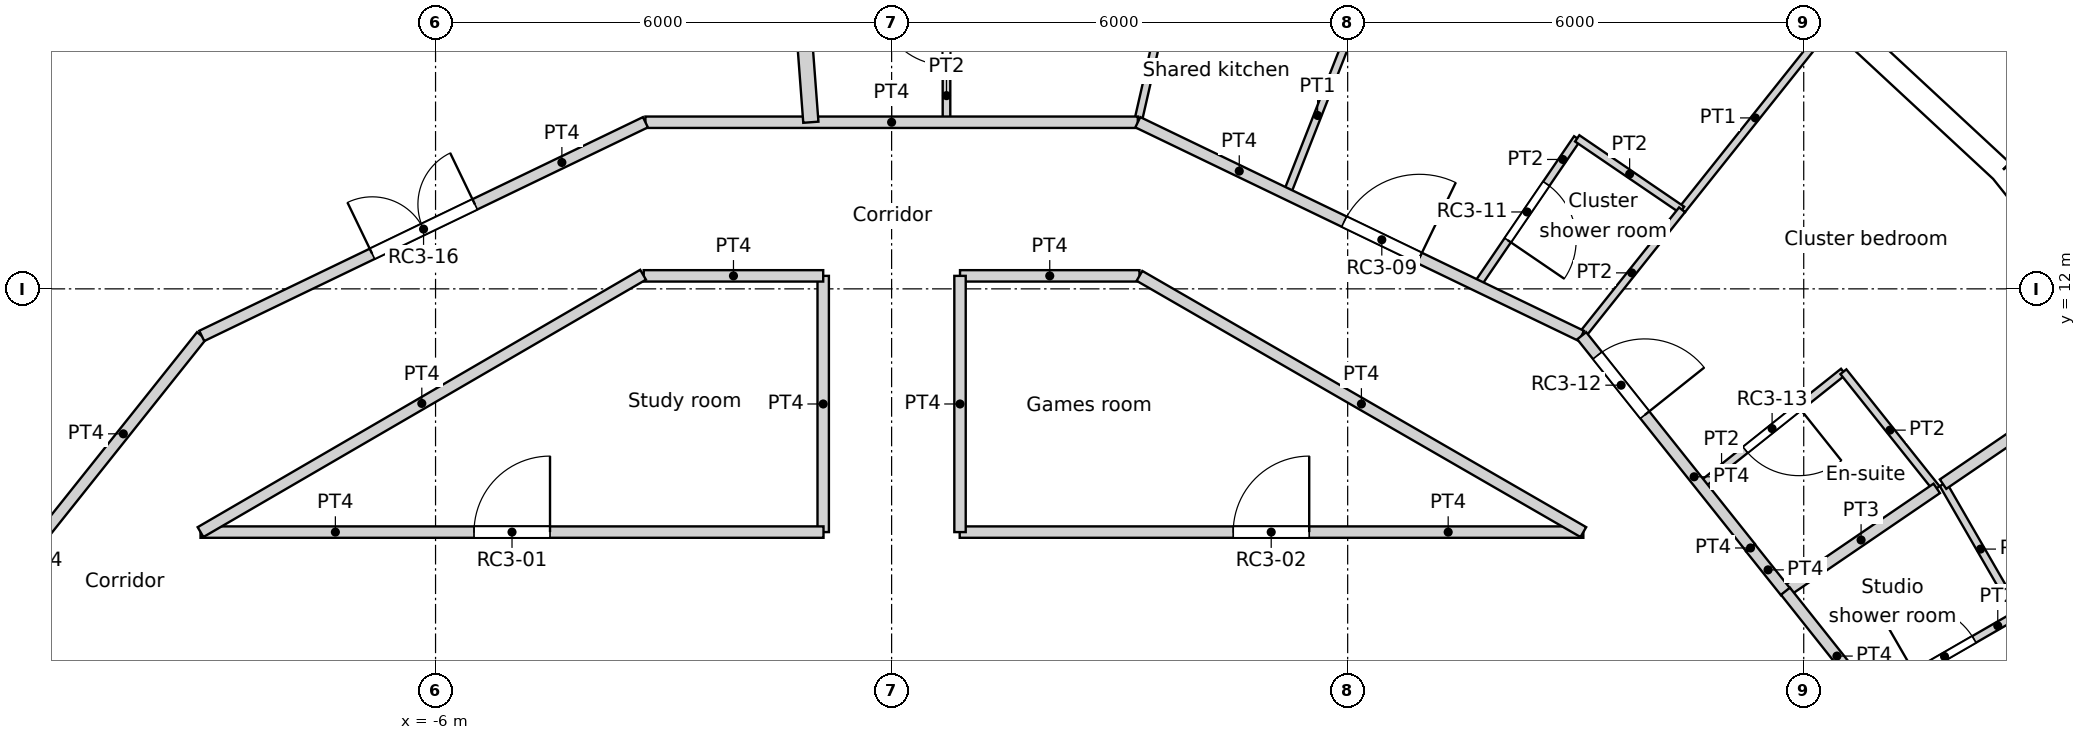
"""IFC4 building model, lengths in metres.
Left out: names, types, materials, properties, quantities, classifications, styles, units other than length and angle.
Written with IfcOpenShell. Run it as: python <this file> out.ifc"""

import sys

from ifc_helpers import new_model, si_unit, direction, frame, frame_2d, origin, origin_2d, place, context, subcontext, project, spatial, rectangle, circle, extrude, element, fill, save


model = new_model("IFC4")
c1 = context("Model", 3, precision=1e-05, world=origin(), true_north=direction((0.0, 1.0)))
c2 = subcontext(c1, "Body", "Model", "MODEL_VIEW")
j1 = project(units=[si_unit("LENGTHUNIT", "METRE"), si_unit("PLANEANGLEUNIT", "RADIAN")], contexts=[c1])
p1 = place(None, origin())
s1 = spatial("IfcSite", under=j1, at=p1, CompositionType="ELEMENT")
p2 = place(p1, origin())
s2 = spatial("IfcBuilding", under=s1, at=p2, CompositionType="ELEMENT")
p3 = place(p2, frame((0.0, 0.0, 252.6)))
s3 = spatial("IfcBuildingStorey", under=s2, at=p3, CompositionType="ELEMENT", Elevation=252.6)
p4 = place(p3, frame((11.735, 14.716, 0.0), z_axis=(0.0, 0.0, 1.0), x_axis=(1.0, 0.0, 0.0)))
e1 = element("IfcColumn", 1, at=p4, inside=s3, PredefinedType="COLUMN", context=c2, shape_type="SweptSolid", body=[
    extrude(circle(Radius=0.55, at=origin_2d()), origin(), (0.0, 0.0, 1.0), 3.6),
])
p5 = place(p3, frame((16.451, 11.234, 0.0), z_axis=(0.0, 0.0, 1.0), x_axis=(-0.623498236992, 0.781824755599, 0.0)))
e2 = element("IfcWall", 2, at=p5, inside=s3, PredefinedType="SOLIDWALL", context=c2, shape_type="SweptSolid", body=[
    extrude(rectangle(XDim=2.962, YDim=0.3, at=frame_2d((1.481, 0.0))), origin(), (0.0, 0.0, 1.0), 3.25),
])
p6 = place(p5, frame((1.481, 0.0, 1.55)))
e3 = element("IfcOpeningElement", 3, at=p6, cuts=e2, PredefinedType="OPENING", context=c2, shape_type="SweptSolid", body=[
    extrude(circle(Radius=0.9, at=origin_2d()), frame((0.0, 0.16, 0.0), z_axis=(0.0, -1.0, 0.0), x_axis=(1.0, 0.0, 0.0)), (0.0, 0.0, 1.0), 0.32),
])
p7 = place(p3, frame((14.604, 13.55, 0.0), z_axis=(0.0, 0.0, 1.0), x_axis=(-0.733066412643, 0.680157066165, 0.0)))
e4 = element("IfcWall", 4, at=p7, inside=s3, PredefinedType="SOLIDWALL", context=c2, shape_type="SweptSolid", body=[
    extrude(rectangle(XDim=2.962, YDim=0.3, at=frame_2d((1.481, 0.0))), origin(), (0.0, 0.0, 1.0), 3.25),
])
p8 = place(p7, frame((1.481, 0.0, 1.55)))
e5 = element("IfcOpeningElement", 5, at=p8, cuts=e4, PredefinedType="OPENING", context=c2, shape_type="SweptSolid", body=[
    extrude(circle(Radius=0.9, at=origin_2d()), frame((0.0, 0.16, 0.0), z_axis=(0.0, -1.0, 0.0), x_axis=(1.0, 0.0, 0.0)), (0.0, 0.0, 1.0), 0.32),
])
p9 = place(p3, frame((-9.092, 8.8, 0.0), z_axis=(0.0, 0.0, 1.0), x_axis=(0.864470922103, 0.502682827277, 0.0)))
e6 = element("IfcWall", 6, at=p9, inside=s3, PredefinedType="PARTITIONING", context=c2, shape_type="SweptSolid", body=[
    extrude(rectangle(XDim=6.735, YDim=0.15, at=frame_2d((3.368, 0.0))), origin(), (0.0, 0.0, 1.0), 3.25),
])
p10 = place(p3, frame((-9.092, 8.8, 0.0), z_axis=(0.0, 0.0, 1.0), x_axis=(1.0, 0.0, 0.0)))
e7 = element("IfcWall", 7, at=p10, inside=s3, PredefinedType="PARTITIONING", context=c2, shape_type="SweptSolid", body=[
    extrude(rectangle(XDim=8.196, YDim=0.15, at=frame_2d((4.098, 0.0))), origin(), (0.0, 0.0, 1.0), 3.25),
])
p11 = place(p10, frame((3.598, 0.0, 0.0)))
e8 = element("IfcOpeningElement", 8, at=p11, cuts=e7, PredefinedType="OPENING", context=c2, shape_type="SweptSolid", body=[
    extrude(rectangle(XDim=1.0, YDim=2.04, at=frame_2d((0.5, 1.02))), frame((0.0, 0.075, 0.0), z_axis=(0.0, -1.0, 0.0), x_axis=(1.0, 0.0, 0.0)), (0.0, 0.0, 1.0), 0.15),
])
p12 = place(p3, frame((0.896, 8.8, 0.0), z_axis=(0.0, 0.0, 1.0), x_axis=(1.0, 0.0, 0.0)))
e9 = element("IfcWall", 9, at=p12, inside=s3, PredefinedType="PARTITIONING", context=c2, shape_type="SweptSolid", body=[
    extrude(rectangle(XDim=8.205, YDim=0.15, at=frame_2d((4.102, 0.0))), origin(), (0.0, 0.0, 1.0), 3.25),
])
p13 = place(p12, frame((3.598, 0.0, 0.0)))
e10 = element("IfcOpeningElement", 10, at=p13, cuts=e9, PredefinedType="OPENING", context=c2, shape_type="SweptSolid", body=[
    extrude(rectangle(XDim=1.0, YDim=2.04, at=frame_2d((0.5, 1.02))), frame((0.0, 0.075, 0.0), z_axis=(0.0, -1.0, 0.0), x_axis=(1.0, 0.0, 0.0)), (0.0, 0.0, 1.0), 0.15),
])
p14 = place(p3, frame((9.079, 11.384, 0.0), z_axis=(0.0, 0.0, 1.0), x_axis=(0.623165080354, -0.782090328944, 0.0)))
e11 = element("IfcWall", 11, at=p14, inside=s3, PredefinedType="PARTITIONING", context=c2, shape_type="SweptSolid", body=[
    extrude(rectangle(XDim=3.564, YDim=0.15, at=frame_2d((1.782, 0.0))), origin(), (0.0, 0.0, 1.0), 3.25),
])
p15 = place(p14, frame((0.332, 0.0, 0.0)))
e12 = element("IfcOpeningElement", 12, at=p15, cuts=e11, PredefinedType="OPENING", context=c2, shape_type="SweptSolid", body=[
    extrude(rectangle(XDim=1.0, YDim=2.1, at=frame_2d((0.5, 1.05))), frame((0.0, 0.075, 0.0), z_axis=(0.0, -1.0, 0.0), x_axis=(1.0, 0.0, 0.0)), (0.0, 0.0, 1.0), 0.15),
])
p16 = place(p3, frame((11.3, 8.586, 0.0), z_axis=(0.0, 0.0, 1.0), x_axis=(0.0, 1.0, 0.0)))
e13 = element("IfcWall", 13, at=p16, inside=s3, PredefinedType="PARTITIONING", context=c2, shape_type="SweptSolid", body=[
    extrude(rectangle(XDim=0.01, YDim=0.15, at=frame_2d((0.005, 0.0))), origin(), (0.0, 0.0, 1.0), 3.25),
])
p17 = place(p3, frame((-11.136, 8.802, 0.0), z_axis=(0.0, 0.0, 1.0), x_axis=(0.623151397235, 0.782101231379, 0.0)))
e14 = element("IfcWall", 14, at=p17, inside=s3, PredefinedType="PARTITIONING", context=c2, shape_type="SweptSolid", body=[
    extrude(rectangle(XDim=3.301, YDim=0.15, at=frame_2d((1.65, 0.0))), origin(), (0.0, 0.0, 1.0), 3.25),
])
p18 = place(p3, frame((11.76, 8.022, 0.0), z_axis=(0.0, 0.0, 1.0), x_axis=(0.62206805366, -0.782963177049, 0.0)))
e15 = element("IfcWall", 15, at=p18, inside=s3, PredefinedType="PARTITIONING", context=c2, shape_type="SweptSolid", body=[
    extrude(rectangle(XDim=2.179, YDim=0.15, at=frame_2d((1.089, 0.0))), origin(), (0.0, 0.0, 1.0), 3.25),
])
p19 = place(p3, frame((11.3, 8.592, 0.0), z_axis=(0.0, 0.0, 1.0), x_axis=(0.623405636383, -0.781898594785, 0.0)))
e16 = element("IfcWall", 16, at=p19, inside=s3, PredefinedType="PARTITIONING", context=c2, shape_type="SweptSolid", body=[
    extrude(rectangle(XDim=0.74, YDim=0.15, at=frame_2d((0.37, 0.0))), origin(), (0.0, 0.0, 1.0), 3.25),
])
p20 = place(p3, frame((-0.9, 8.8, 0.0), z_axis=(0.0, 0.0, 1.0), x_axis=(0.0, 1.0, 0.0)))
e17 = element("IfcWall", 17, at=p20, inside=s3, PredefinedType="PARTITIONING", context=c2, shape_type="SweptSolid", body=[
    extrude(rectangle(XDim=3.371, YDim=0.15, at=frame_2d((1.686, 0.0))), origin(), (0.0, 0.0, 1.0), 3.25),
])
p21 = place(p3, frame((-3.261, 12.171, 0.0), z_axis=(0.0, 0.0, 1.0), x_axis=(1.0, 0.0, 0.0)))
e18 = element("IfcWall", 18, at=p21, inside=s3, PredefinedType="PARTITIONING", context=c2, shape_type="SweptSolid", body=[
    extrude(rectangle(XDim=2.361, YDim=0.15, at=frame_2d((1.181, 0.0))), origin(), (0.0, 0.0, 1.0), 3.25),
])
p22 = place(p3, frame((3.261, 12.171, 0.0), z_axis=(0.0, 0.0, 1.0), x_axis=(0.866066809554, -0.499928276245, 0.0)))
e19 = element("IfcWall", 19, at=p22, inside=s3, PredefinedType="PARTITIONING", context=c2, shape_type="SweptSolid", body=[
    extrude(rectangle(XDim=6.743, YDim=0.15, at=frame_2d((3.371, 0.0))), origin(), (0.0, 0.0, 1.0), 3.25),
])
p23 = place(p3, frame((0.9, 12.171, 0.0), z_axis=(0.0, 0.0, 1.0), x_axis=(1.0, 0.0, 0.0)))
e20 = element("IfcWall", 20, at=p23, inside=s3, PredefinedType="PARTITIONING", context=c2, shape_type="SweptSolid", body=[
    extrude(rectangle(XDim=2.361, YDim=0.15, at=frame_2d((1.181, 0.0))), origin(), (0.0, 0.0, 1.0), 3.25),
])
p24 = place(p3, frame((0.9, 8.8, 0.0), z_axis=(0.0, 0.0, 1.0), x_axis=(0.0, 1.0, 0.0)))
e21 = element("IfcWall", 21, at=p24, inside=s3, PredefinedType="PARTITIONING", context=c2, shape_type="SweptSolid", body=[
    extrude(rectangle(XDim=3.371, YDim=0.15, at=frame_2d((1.686, 0.0))), origin(), (0.0, 0.0, 1.0), 3.25),
])
p25 = place(p3, frame((3.239, 14.192, 0.0), z_axis=(0.0, 0.0, 1.0), x_axis=(0.90093183072, -0.433960639224, 0.0)))
e22 = element("IfcWall", 22, at=p25, inside=s3, PredefinedType="PARTITIONING", context=c2, shape_type="SweptSolid", body=[
    extrude(rectangle(XDim=6.479, YDim=0.15, at=frame_2d((3.239, 0.0))), origin(), (0.0, 0.0, 1.0), 3.25),
])
p26 = place(p25, frame((3.013, 0.0, 0.0)))
e23 = element("IfcOpeningElement", 23, at=p26, cuts=e22, PredefinedType="OPENING", context=c2, shape_type="SweptSolid", body=[
    extrude(rectangle(XDim=1.1, YDim=2.1, at=frame_2d((0.55, 1.05))), frame((0.0, 0.075, 0.0), z_axis=(0.0, -1.0, 0.0), x_axis=(1.0, 0.0, 0.0)), (0.0, 0.0, 1.0), 0.15),
])
p27 = place(p3, frame((-3.239, 14.192, 0.0), z_axis=(0.0, 0.0, 1.0), x_axis=(1.0, 0.0, 0.0)))
e24 = element("IfcWall", 24, at=p27, inside=s3, PredefinedType="PARTITIONING", context=c2, shape_type="SweptSolid", body=[
    extrude(rectangle(XDim=6.478, YDim=0.15, at=frame_2d((3.239, 0.0))), origin(), (0.0, 0.0, 1.0), 3.25),
])
p28 = place(p3, frame((-9.076, 11.381, 0.0), z_axis=(0.0, 0.0, 1.0), x_axis=(0.900976027191, 0.433868872388, 0.0)))
e25 = element("IfcWall", 25, at=p28, inside=s3, PredefinedType="PARTITIONING", context=c2, shape_type="SweptSolid", body=[
    extrude(rectangle(XDim=6.479, YDim=0.15, at=frame_2d((3.239, 0.0))), origin(), (0.0, 0.0, 1.0), 3.25),
])
p29 = place(p28, frame((2.489, 0.0, 0.0)))
e26 = element("IfcOpeningElement", 26, at=p29, cuts=e25, PredefinedType="OPENING", context=c2, shape_type="SweptSolid", body=[
    extrude(rectangle(XDim=1.5, YDim=2.1, at=frame_2d((0.75, 1.05))), frame((0.0, 0.075, 0.0), z_axis=(0.0, -1.0, 0.0), x_axis=(1.0, 0.0, 0.0)), (0.0, 0.0, 1.0), 0.15),
])
p30 = place(p3, frame((12.885, 6.605, 0.0), z_axis=(0.0, 0.0, 1.0), x_axis=(0.866076416361, 0.499911633214, 0.0)))
e27 = element("IfcWall", 27, at=p30, inside=s3, PredefinedType="PARTITIONING", context=c2, shape_type="SweptSolid", body=[
    extrude(rectangle(XDim=2.234, YDim=0.1, at=frame_2d((1.117, 0.0))), origin(), (0.0, 0.0, 1.0), 3.25),
])
p31 = place(p30, frame((0.667, 0.0, 0.0)))
e28 = element("IfcOpeningElement", 28, at=p31, cuts=e27, PredefinedType="OPENING", context=c2, shape_type="SweptSolid", body=[
    extrude(rectangle(XDim=0.9, YDim=2.04, at=frame_2d((0.45, 1.02))), frame((0.0, 0.05, 0.0), z_axis=(0.0, -1.0, 0.0), x_axis=(1.0, 0.0, 0.0)), (0.0, 0.0, 1.0), 0.1),
])
p32 = place(p3, frame((13.833, 9.431, 0.0), z_axis=(0.0, 0.0, 1.0), x_axis=(0.500143626598, -0.865942465048, 0.0)))
e29 = element("IfcWall", 29, at=p32, inside=s3, PredefinedType="PARTITIONING", context=c2, shape_type="SweptSolid", body=[
    extrude(rectangle(XDim=1.974, YDim=0.1, at=frame_2d((0.987, 0.0))), origin(), (0.0, 0.0, 1.0), 3.25),
])
p33 = place(p3, frame((13.833, 9.431, 0.0), z_axis=(0.0, 0.0, 1.0), x_axis=(0.826152320289, 0.56344684193, 0.0)))
e30 = element("IfcWall", 30, at=p33, inside=s3, PredefinedType="PARTITIONING", context=c2, shape_type="SweptSolid", body=[
    extrude(rectangle(XDim=3.03, YDim=0.15, at=frame_2d((1.515, 0.0))), origin(), (0.0, 0.0, 1.0), 3.25),
])
p34 = place(p3, frame((11.759, 8.017, 0.0), z_axis=(0.0, 0.0, 1.0), x_axis=(0.826143746222, 0.563459413426, 0.0)))
e31 = element("IfcWall", 31, at=p34, inside=s3, PredefinedType="PARTITIONING", context=c2, shape_type="SweptSolid", body=[
    extrude(rectangle(XDim=2.41, YDim=0.15, at=frame_2d((1.205, 0.0))), origin(), (0.0, 0.0, 1.0), 3.25),
])
p35 = place(p3, frame((5.199, 13.248, 0.0), z_axis=(0.0, 0.0, 1.0), x_axis=(0.365334662456, 0.930876245485, 0.0)))
e32 = element("IfcWall", 32, at=p35, inside=s3, PredefinedType="PARTITIONING", context=c2, shape_type="SweptSolid", body=[
    extrude(rectangle(XDim=5.54, YDim=0.1, at=frame_2d((2.77, 0.0))), origin(), (0.0, 0.0, 1.0), 3.25),
])
p36 = place(p35, frame((2.27, 0.0, 0.0)))
e33 = element("IfcOpeningElement", 33, at=p36, cuts=e32, PredefinedType="OPENING", context=c2, shape_type="SweptSolid", body=[
    extrude(rectangle(XDim=1.0, YDim=2.04, at=frame_2d((0.5, 1.02))), frame((0.0, 0.05, 0.0), z_axis=(0.0, -1.0, 0.0), x_axis=(1.0, 0.0, 0.0)), (0.0, 0.0, 1.0), 0.1),
])
p37 = place(p3, frame((9.02, 13.98, 0.0), z_axis=(0.0, 0.0, 1.0), x_axis=(0.826289240924, -0.563246030021, 0.0)))
e34 = element("IfcWall", 34, at=p37, inside=s3, PredefinedType="PARTITIONING", context=c2, shape_type="SweptSolid", body=[
    extrude(rectangle(XDim=1.669, YDim=0.1, at=frame_2d((0.834, 0.0))), origin(), (0.0, 0.0, 1.0), 3.25),
])
p38 = place(p3, frame((7.7, 12.044, 0.0), z_axis=(0.0, 0.0, 1.0), x_axis=(0.563349756349, 0.826218525586, 0.0)))
e35 = element("IfcWall", 35, at=p38, inside=s3, PredefinedType="PARTITIONING", context=c2, shape_type="SweptSolid", body=[
    extrude(rectangle(XDim=2.343, YDim=0.1, at=frame_2d((1.172, 0.0))), origin(), (0.0, 0.0, 1.0), 3.25),
])
p39 = place(p38, frame((0.721, 0.0, 0.0)))
e36 = element("IfcOpeningElement", 36, at=p39, cuts=e35, PredefinedType="OPENING", context=c2, shape_type="SweptSolid", body=[
    extrude(rectangle(XDim=0.9, YDim=2.0, at=frame_2d((0.45, 1.0))), frame((0.0, 0.05, 0.0), z_axis=(0.0, -1.0, 0.0), x_axis=(1.0, 0.0, 0.0)), (0.0, 0.0, 1.0), 0.1),
])
p40 = place(p3, frame((10.399, 13.04, 0.0), z_axis=(0.0, 0.0, 1.0), x_axis=(0.62343302941, 0.781876753613, 0.0)))
e37 = element("IfcWall", 37, at=p40, inside=s3, PredefinedType="PARTITIONING", context=c2, shape_type="SweptSolid", body=[
    extrude(rectangle(XDim=3.093, YDim=0.1, at=frame_2d((1.546, 0.0))), origin(), (0.0, 0.0, 1.0), 3.25),
])
p41 = place(p3, frame((3.239, 14.192, 0.0), z_axis=(0.0, 0.0, 1.0), x_axis=(0.222612505682, 0.974907007008, 0.0)))
e38 = element("IfcWall", 38, at=p41, inside=s3, PredefinedType="PARTITIONING", context=c2, shape_type="SweptSolid", body=[
    extrude(rectangle(XDim=5.215, YDim=0.1, at=frame_2d((2.607, 0.0))), origin(), (0.0, 0.0, 1.0), 3.25),
])
p42 = place(p41, frame((2.353, 0.0, 0.0)))
e39 = element("IfcOpeningElement", 39, at=p42, cuts=e38, PredefinedType="OPENING", context=c2, shape_type="SweptSolid", body=[
    extrude(rectangle(XDim=0.9, YDim=2.1, at=frame_2d((0.45, 1.05))), frame((0.0, 0.05, 0.0), z_axis=(0.0, -1.0, 0.0), x_axis=(1.0, 0.0, 0.0)), (0.0, 0.0, 1.0), 0.1),
])
p43 = place(p3, frame((9.076, 11.381, 0.0), z_axis=(0.0, 0.0, 1.0), x_axis=(0.623501640025, 0.781822041699, 0.0)))
e40 = element("IfcWall", 40, at=p43, inside=s3, PredefinedType="PARTITIONING", context=c2, shape_type="SweptSolid", body=[
    extrude(rectangle(XDim=2.122, YDim=0.1, at=frame_2d((1.061, 0.0))), origin(), (0.0, 0.0, 1.0), 3.25),
])
p44 = place(p3, frame((12.522, 10.91, 0.0), z_axis=(0.0, 0.0, 1.0), x_axis=(0.623330716607, -0.781958322249, 0.0)))
e41 = element("IfcWall", 41, at=p44, inside=s3, PredefinedType="PARTITIONING", context=c2, shape_type="SweptSolid", body=[
    extrude(rectangle(XDim=1.965, YDim=0.1, at=frame_2d((0.983, 0.0))), origin(), (0.0, 0.0, 1.0), 3.25),
])
p45 = place(p3, frame((10.645, 9.413, 0.0), z_axis=(0.0, 0.0, 1.0), x_axis=(0.781830263661, 0.623491330191, 0.0)))
e42 = element("IfcWall", 42, at=p45, inside=s3, PredefinedType="PARTITIONING", context=c2, shape_type="SweptSolid", body=[
    extrude(rectangle(XDim=2.401, YDim=0.1, at=frame_2d((1.2, 0.0))), origin(), (0.0, 0.0, 1.0), 3.25),
])
p46 = place(p45, frame((0.751, 0.0, 0.0)))
e43 = element("IfcOpeningElement", 43, at=p46, cuts=e42, PredefinedType="OPENING", context=c2, shape_type="SweptSolid", body=[
    extrude(rectangle(XDim=0.9, YDim=2.04, at=frame_2d((0.45, 1.02))), frame((0.0, 0.05, 0.0), z_axis=(0.0, -1.0, 0.0), x_axis=(1.0, 0.0, 0.0)), (0.0, 0.0, 1.0), 0.1),
])
p47 = place(p3, frame((0.722, 14.192, 0.0), z_axis=(0.0, 0.0, 1.0), x_axis=(0.0, 1.0, 0.0)))
e44 = element("IfcWall", 44, at=p47, inside=s3, PredefinedType="PARTITIONING", context=c2, shape_type="SweptSolid", body=[
    extrude(rectangle(XDim=2.4, YDim=0.1, at=frame_2d((1.2, 0.0))), origin(), (0.0, 0.0, 1.0), 3.25),
])
p48 = place(p47, frame((0.75, 0.0, 0.0)))
e45 = element("IfcOpeningElement", 45, at=p48, cuts=e44, PredefinedType="OPENING", context=c2, shape_type="SweptSolid", body=[
    extrude(rectangle(XDim=0.9, YDim=2.04, at=frame_2d((0.45, 1.02))), frame((0.0, 0.05, 0.0), z_axis=(0.0, -1.0, 0.0), x_axis=(1.0, 0.0, 0.0)), (0.0, 0.0, 1.0), 0.1),
])
p49 = place(p3, frame((-1.478, 19.716, 0.0), z_axis=(0.0, 0.0, 1.0), x_axis=(0.075011267216, -0.997182686267, 0.0)))
e46 = element("IfcWall", 46, at=p49, inside=s3, PredefinedType="PARTITIONING", context=c2, shape_type="SweptSolid", body=[
    extrude(rectangle(XDim=5.54, YDim=0.2, at=frame_2d((2.77, 0.0))), origin(), (0.0, 0.0, 1.0), 3.25),
])
p50 = place(p8, origin())
e47 = element("IfcWindow", 47, at=p50, inside=s3, PartitioningType="SINGLE_PANEL", PredefinedType="WINDOW", context=c2, shape_type="SweptSolid", body=[
    extrude(circle(Radius=0.9, at=origin_2d()), frame((0.0, 0.12, 0.0), z_axis=(0.0, -1.0, 0.0), x_axis=(1.0, 0.0, 0.0)), (0.0, 0.0, 1.0), 0.1),
])
fill(e5, e47)
p51 = place(p11, origin())
e48 = element("IfcDoor", 48, at=p51, inside=s3, OperationType="SINGLE_SWING_RIGHT", PredefinedType="DOOR", context=c2, shape_type="SweptSolid", body=[
    extrude(rectangle(XDim=1.0, YDim=2.04, at=frame_2d((0.5, 1.02))), frame((0.0, 0.025, 0.0), z_axis=(0.0, -1.0, 0.0), x_axis=(1.0, 0.0, 0.0)), (0.0, 0.0, 1.0), 0.05),
])
fill(e8, e48)
p52 = place(p13, origin())
e49 = element("IfcDoor", 49, at=p52, inside=s3, OperationType="SINGLE_SWING_RIGHT", PredefinedType="DOOR", context=c2, shape_type="SweptSolid", body=[
    extrude(rectangle(XDim=1.0, YDim=2.04, at=frame_2d((0.5, 1.02))), frame((0.0, 0.025, 0.0), z_axis=(0.0, -1.0, 0.0), x_axis=(1.0, 0.0, 0.0)), (0.0, 0.0, 1.0), 0.05),
])
fill(e10, e49)
p53 = place(p31, origin())
e50 = element("IfcDoor", 50, at=p53, inside=s3, OperationType="SINGLE_SWING_LEFT", PredefinedType="DOOR", context=c2, shape_type="SweptSolid", body=[
    extrude(rectangle(XDim=0.9, YDim=2.04, at=frame_2d((0.45, 1.02))), frame((0.0, 0.025, 0.0), z_axis=(0.0, -1.0, 0.0), x_axis=(1.0, 0.0, 0.0)), (0.0, 0.0, 1.0), 0.05),
])
fill(e28, e50)
p54 = place(p26, origin())
e51 = element("IfcDoor", 51, at=p54, inside=s3, OperationType="SINGLE_SWING_RIGHT", PredefinedType="DOOR", context=c2, shape_type="SweptSolid", body=[
    extrude(rectangle(XDim=1.1, YDim=2.1, at=frame_2d((0.55, 1.05))), frame((0.0, 0.025, 0.0), z_axis=(0.0, -1.0, 0.0), x_axis=(1.0, 0.0, 0.0)), (0.0, 0.0, 1.0), 0.05),
])
fill(e23, e51)
p55 = place(p39, origin())
e52 = element("IfcDoor", 52, at=p55, inside=s3, OperationType="SINGLE_SWING_RIGHT", PredefinedType="DOOR", context=c2, shape_type="SweptSolid", body=[
    extrude(rectangle(XDim=0.9, YDim=2.0, at=frame_2d((0.45, 1.0))), frame((0.0, 0.025, 0.0), z_axis=(0.0, -1.0, 0.0), x_axis=(1.0, 0.0, 0.0)), (0.0, 0.0, 1.0), 0.05),
])
fill(e36, e52)
p56 = place(p15, origin())
e53 = element("IfcDoor", 53, at=p56, inside=s3, OperationType="SINGLE_SWING_RIGHT", PredefinedType="DOOR", context=c2, shape_type="SweptSolid", body=[
    extrude(rectangle(XDim=1.0, YDim=2.1, at=frame_2d((0.5, 1.05))), frame((0.0, 0.025, 0.0), z_axis=(0.0, -1.0, 0.0), x_axis=(1.0, 0.0, 0.0)), (0.0, 0.0, 1.0), 0.05),
])
fill(e12, e53)
p57 = place(p46, origin())
e54 = element("IfcDoor", 54, at=p57, inside=s3, OperationType="SINGLE_SWING_LEFT", PredefinedType="DOOR", context=c2, shape_type="SweptSolid", body=[
    extrude(rectangle(XDim=0.9, YDim=2.04, at=frame_2d((0.45, 1.02))), frame((0.0, 0.025, 0.0), z_axis=(0.0, -1.0, 0.0), x_axis=(1.0, 0.0, 0.0)), (0.0, 0.0, 1.0), 0.05),
])
fill(e43, e54)
p58 = place(p48, origin())
e55 = element("IfcDoor", 55, at=p58, inside=s3, OperationType="SINGLE_SWING_RIGHT", PredefinedType="DOOR", context=c2, shape_type="SweptSolid", body=[
    extrude(rectangle(XDim=0.9, YDim=2.04, at=frame_2d((0.45, 1.02))), frame((0.0, 0.025, 0.0), z_axis=(0.0, -1.0, 0.0), x_axis=(1.0, 0.0, 0.0)), (0.0, 0.0, 1.0), 0.05),
])
fill(e45, e55)
p59 = place(p29, origin())
e56 = element("IfcDoor", 56, at=p59, inside=s3, OperationType="DOUBLE_DOOR_SINGLE_SWING", PredefinedType="DOOR", context=c2, shape_type="SweptSolid", body=[
    extrude(rectangle(XDim=1.5, YDim=2.1, at=frame_2d((0.75, 1.05))), frame((0.0, 0.025, 0.0), z_axis=(0.0, -1.0, 0.0), x_axis=(1.0, 0.0, 0.0)), (0.0, 0.0, 1.0), 0.05),
])
fill(e26, e56)
save(model, sys.argv[1])
